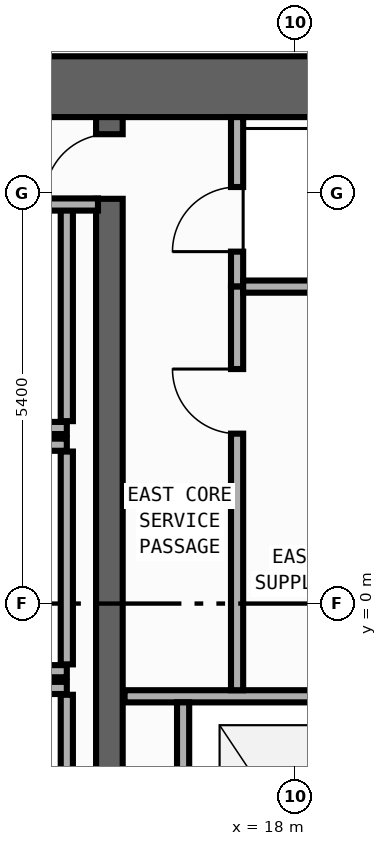
"""IFC4 building model, lengths in metres.
Left out: names, types, materials, properties, quantities, classifications, styles, units other than length and angle.
Written with IfcOpenShell. Run it as: python <this file> out.ifc"""

import sys

from ifc_helpers import new_model, si_unit, direction, frame, frame_2d, origin, place, context, subcontext, project, spatial, rectangle, extrude, element, fill, save


model = new_model("IFC4")
c1 = context("Model", 3, precision=1e-05, world=origin(), true_north=direction((0.0, 1.0)))
c2 = subcontext(c1, "Body", "Model", "MODEL_VIEW")
j1 = project(units=[si_unit("LENGTHUNIT", "METRE"), si_unit("PLANEANGLEUNIT", "RADIAN")], contexts=[c1])
p1 = place(None, origin())
s1 = spatial("IfcSite", under=j1, at=p1, CompositionType="ELEMENT")
p2 = place(p1, origin())
s2 = spatial("IfcBuilding", under=s1, at=p2, CompositionType="ELEMENT")
p3 = place(p2, frame((0.0, 0.0, 118.4)))
s3 = spatial("IfcBuildingStorey", under=s2, at=p3, CompositionType="ELEMENT", Elevation=118.4)
p4 = place(p3, frame((12.8, 6.8, 0.0), z_axis=(0.0, 0.0, 1.0), x_axis=(1.0, 0.0, 0.0)))
e1 = element("IfcWall", 1, at=p4, inside=s3, PredefinedType="SHEAR", context=c2, shape_type="SweptSolid", body=[
    extrude(rectangle(XDim=6.8, YDim=0.8, at=frame_2d((3.4, 0.0))), origin(), (0.0, 0.0, 1.0), 3.94),
])
p5 = place(p3, frame((15.55, -19.0, 0.0), z_axis=(0.0, 0.0, 1.0), x_axis=(0.0, 1.0, 0.0)))
e2 = element("IfcWall", 2, at=p5, inside=s3, PredefinedType="SHEAR", context=c2, shape_type="SweptSolid", body=[
    extrude(rectangle(XDim=25.4, YDim=0.35, at=frame_2d((12.7, 0.0))), origin(), (0.0, 0.0, 1.0), 3.94),
])
p6 = place(p5, frame((11.925, 0.0, 0.0)))
e3 = element("IfcOpeningElement", 3, at=p6, cuts=e2, PredefinedType="OPENING", context=c2, shape_type="SweptSolid", body=[
    extrude(rectangle(XDim=1.15, YDim=2.2, at=frame_2d((0.575, 1.1))), frame((0.0, 0.185, 0.0), z_axis=(0.0, -1.0, 0.0), x_axis=(1.0, 0.0, 0.0)), (0.0, 0.0, 1.0), 0.37),
])
p7 = place(p5, frame((24.325, 0.0, 0.0)))
e4 = element("IfcOpeningElement", 4, at=p7, cuts=e2, PredefinedType="OPENING", context=c2, shape_type="SweptSolid", body=[
    extrude(rectangle(XDim=0.85, YDim=2.1, at=frame_2d((0.425, 1.05))), frame((0.0, 0.185, 0.0), z_axis=(0.0, -1.0, 0.0), x_axis=(1.0, 0.0, 0.0)), (0.0, 0.0, 1.0), 0.37),
])
p8 = place(p3, frame((12.8, 2.31, 0.0), z_axis=(0.0, 0.0, 1.0), x_axis=(1.0, 0.0, 0.0)))
e5 = element("IfcWall", 5, at=p8, inside=s3, PredefinedType="STANDARD", context=c2, shape_type="SweptSolid", body=[
    extrude(rectangle(XDim=2.19, YDim=0.16, at=frame_2d((1.095, 0.0))), origin(), (0.0, 0.0, 1.0), 3.94),
])
p9 = place(p3, frame((14.99, 2.4, 0.0), z_axis=(0.0, 0.0, 1.0), x_axis=(0.0, 1.0, 0.0)))
e6 = element("IfcWall", 6, at=p9, inside=s3, PredefinedType="STANDARD", context=c2, shape_type="SweptSolid", body=[
    extrude(rectangle(XDim=2.8, YDim=0.16, at=frame_2d((1.4, 0.0))), origin(), (0.0, 0.0, 1.0), 3.94),
])
for number, where, z_axis, x_axis in (
    (7, (12.8, -0.89, 0.0), (0.0, 0.0, 1.0), (1.0, 0.0, 0.0)),
    (8, (12.8, 2.09, 0.0), (0.0, 0.0, 1.0), (1.0, 0.0, 0.0)),
):
    element("IfcWall", number, at=place(p3, frame(where, z_axis=z_axis, x_axis=x_axis)), inside=s3, PredefinedType="STANDARD", context=c2, shape_type="SweptSolid", body=[
        extrude(rectangle(XDim=2.19, YDim=0.16, at=frame_2d((1.095, 0.0))), origin(), (0.0, 0.0, 1.0), 3.94),
    ])
p10 = place(p3, frame((14.99, -0.8, 0.0), z_axis=(0.0, 0.0, 1.0), x_axis=(0.0, 1.0, 0.0)))
e9 = element("IfcWall", 9, at=p10, inside=s3, PredefinedType="STANDARD", context=c2, shape_type="SweptSolid", body=[
    extrude(rectangle(XDim=2.8, YDim=0.16, at=frame_2d((1.4, 0.0))), origin(), (0.0, 0.0, 1.0), 3.94),
])
p11 = place(p3, frame((12.8, -1.11, 0.0), z_axis=(0.0, 0.0, 1.0), x_axis=(1.0, 0.0, 0.0)))
e10 = element("IfcWall", 10, at=p11, inside=s3, PredefinedType="STANDARD", context=c2, shape_type="SweptSolid", body=[
    extrude(rectangle(XDim=2.19, YDim=0.16, at=frame_2d((1.095, 0.0))), origin(), (0.0, 0.0, 1.0), 3.94),
])
p12 = place(p3, frame((14.99, -4.0, 0.0), z_axis=(0.0, 0.0, 1.0), x_axis=(0.0, 1.0, 0.0)))
e11 = element("IfcWall", 11, at=p12, inside=s3, PredefinedType="STANDARD", context=c2, shape_type="SweptSolid", body=[
    extrude(rectangle(XDim=2.8, YDim=0.16, at=frame_2d((1.4, 0.0))), origin(), (0.0, 0.0, 1.0), 3.94),
])
p13 = place(p3, frame((15.75, -1.22, 0.0), z_axis=(0.0, 0.0, 1.0), x_axis=(1.0, 0.0, 0.0)))
e12 = element("IfcWall", 12, at=p13, inside=s3, PredefinedType="STANDARD", context=c2, shape_type="SweptSolid", body=[
    extrude(rectangle(XDim=3.8, YDim=0.16, at=frame_2d((1.9, 0.0))), origin(), (0.0, 0.0, 1.0), 3.94),
])
p14 = place(p3, frame((16.52, -4.28, 0.0), z_axis=(0.0, 0.0, 1.0), x_axis=(0.0, 1.0, 0.0)))
e13 = element("IfcWall", 13, at=p14, inside=s3, PredefinedType="STANDARD", context=c2, shape_type="SweptSolid", body=[
    extrude(rectangle(XDim=2.98, YDim=0.16, at=frame_2d((1.49, 0.0))), origin(), (0.0, 0.0, 1.0), 3.94),
])
p15 = place(p3, frame((12.8, 5.25, 0.0), z_axis=(0.0, 0.0, 1.0), x_axis=(1.0, 0.0, 0.0)))
e14 = element("IfcWall", 14, at=p15, inside=s3, PredefinedType="STANDARD", context=c2, shape_type="SweptSolid", body=[
    extrude(rectangle(XDim=2.6, YDim=0.16, at=frame_2d((1.3, 0.0))), origin(), (0.0, 0.0, 1.0), 3.94),
])
p16 = place(p3, frame((17.23, 4.17, 0.0), z_axis=(0.0, 0.0, 1.0), x_axis=(0.0, 1.0, 0.0)))
e15 = element("IfcWall", 15, at=p16, inside=s3, PredefinedType="PARTITIONING", context=c2, shape_type="SweptSolid", body=[
    extrude(rectangle(XDim=2.23, YDim=0.16, at=frame_2d((1.115, 0.0))), origin(), (0.0, 0.0, 1.0), 3.94),
])
p17 = place(p16, frame((0.46, 0.0, 0.0)))
e16 = element("IfcOpeningElement", 16, at=p17, cuts=e15, PredefinedType="OPENING", context=c2, shape_type="SweptSolid", body=[
    extrude(rectangle(XDim=0.85, YDim=2.1, at=frame_2d((0.425, 1.05))), frame((0.0, 0.09, 0.0), z_axis=(0.0, -1.0, 0.0), x_axis=(1.0, 0.0, 0.0)), (0.0, 0.0, 1.0), 0.18),
])
p18 = place(p3, frame((17.23, -1.14, 0.0), z_axis=(0.0, 0.0, 1.0), x_axis=(0.0, 1.0, 0.0)))
e17 = element("IfcWall", 17, at=p18, inside=s3, PredefinedType="PARTITIONING", context=c2, shape_type="SweptSolid", body=[
    extrude(rectangle(XDim=5.31, YDim=0.16, at=frame_2d((2.655, 0.0))), origin(), (0.0, 0.0, 1.0), 3.94),
])
p19 = place(p18, frame((3.375, 0.0, 0.0)))
e18 = element("IfcOpeningElement", 18, at=p19, cuts=e17, PredefinedType="OPENING", context=c2, shape_type="SweptSolid", body=[
    extrude(rectangle(XDim=0.85, YDim=2.1, at=frame_2d((0.425, 1.05))), frame((0.0, 0.09, 0.0), z_axis=(0.0, -1.0, 0.0), x_axis=(1.0, 0.0, 0.0)), (0.0, 0.0, 1.0), 0.18),
])
p20 = place(p3, frame((17.31, 4.17, 0.0), z_axis=(0.0, 0.0, 1.0), x_axis=(1.0, 0.0, 0.0)))
e19 = element("IfcWall", 19, at=p20, inside=s3, PredefinedType="PARTITIONING", context=c2, shape_type="SweptSolid", body=[
    extrude(rectangle(XDim=2.29, YDim=0.16, at=frame_2d((1.145, 0.0))), origin(), (0.0, 0.0, 1.0), 3.94),
])
p21 = place(p7, origin())
e20 = element("IfcDoor", 20, at=p21, inside=s3, OperationType="SINGLE_SWING_LEFT", PredefinedType="DOOR", context=c2, shape_type="SweptSolid", body=[
    extrude(rectangle(XDim=0.85, YDim=2.1, at=frame_2d((0.425, 1.05))), frame((0.0, 0.025, 0.0), z_axis=(0.0, -1.0, 0.0), x_axis=(1.0, 0.0, 0.0)), (0.0, 0.0, 1.0), 0.05),
])
fill(e4, e20)
p22 = place(p17, origin())
e21 = element("IfcDoor", 21, at=p22, inside=s3, OperationType="SINGLE_SWING_LEFT", PredefinedType="DOOR", context=c2, shape_type="SweptSolid", body=[
    extrude(rectangle(XDim=0.85, YDim=2.1, at=frame_2d((0.425, 1.05))), frame((0.0, 0.025, 0.0), z_axis=(0.0, -1.0, 0.0), x_axis=(1.0, 0.0, 0.0)), (0.0, 0.0, 1.0), 0.05),
])
fill(e16, e21)
p23 = place(p19, origin())
e22 = element("IfcDoor", 22, at=p23, inside=s3, OperationType="SINGLE_SWING_RIGHT", PredefinedType="DOOR", context=c2, shape_type="SweptSolid", body=[
    extrude(rectangle(XDim=0.85, YDim=2.1, at=frame_2d((0.425, 1.05))), frame((0.0, 0.025, 0.0), z_axis=(0.0, -1.0, 0.0), x_axis=(1.0, 0.0, 0.0)), (0.0, 0.0, 1.0), 0.05),
])
fill(e18, e22)
save(model, sys.argv[1])
